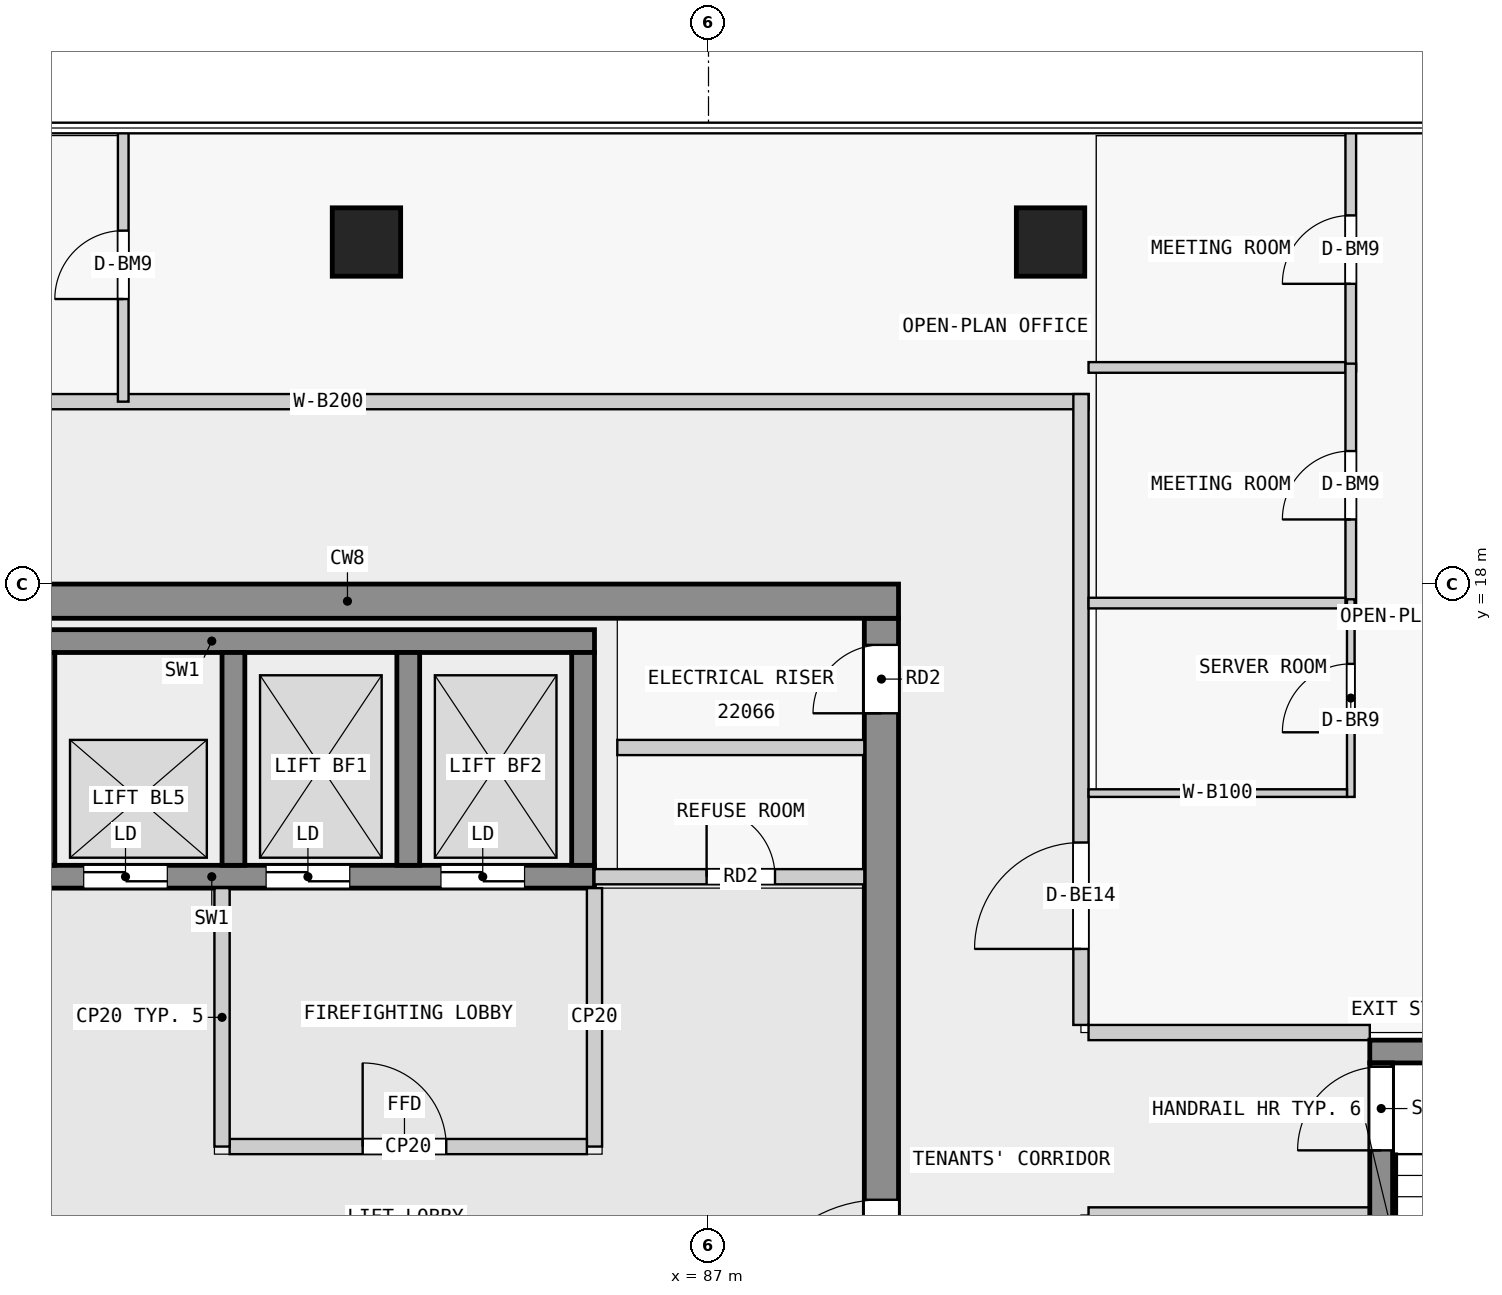
"""IFC4 building model, lengths in metres.
Left out: names, types, materials, properties, quantities, classifications, styles, units other than length and angle.
Written with IfcOpenShell. Run it as: python <this file> out.ifc"""

import sys

from ifc_helpers import new_model, si_unit, direction, frame, frame_2d, origin, origin_2d, place, context, subcontext, project, spatial, rectangle, extrude, element, fill, save


model = new_model("IFC4")
c1 = context("Model", 3, precision=1e-05, world=origin(), true_north=direction((0.0, 1.0)))
c2 = subcontext(c1, "Body", "Model", "MODEL_VIEW")
j1 = project(units=[si_unit("LENGTHUNIT", "METRE"), si_unit("PLANEANGLEUNIT", "RADIAN")], contexts=[c1])
p1 = place(None, origin())
s1 = spatial("IfcSite", under=j1, at=p1, CompositionType="ELEMENT")
p2 = place(p1, origin())
s2 = spatial("IfcBuilding", under=s1, at=p2, CompositionType="ELEMENT")
p3 = place(p2, frame((0.0, 0.0, 88.8)))
s3 = spatial("IfcBuildingStorey", under=s2, at=p3, CompositionType="ELEMENT", Elevation=88.8)
for number, where, z_axis, x_axis in (
    (1, (91.5, 22.5, 0.0), (0.0, 0.0, 1.0), (1.0, 0.0, 0.0)),
    (2, (82.5, 22.5, 0.0), (0.0, 0.0, 1.0), (1.0, 0.0, 0.0)),
):
    element("IfcColumn", number, at=place(p3, frame(where, z_axis=z_axis, x_axis=x_axis)), inside=s3, PredefinedType="COLUMN", context=c2, shape_type="SweptSolid", body=[
        extrude(rectangle(XDim=0.9, YDim=0.9, at=origin_2d()), origin(), (0.0, 0.0, 1.0), 3.5),
    ])
p4 = place(p3, frame((75.0, 17.775, 0.0), z_axis=(0.0, 0.0, 1.0), x_axis=(1.0, 0.0, 0.0)))
e3 = element("IfcWall", 3, at=p4, inside=s3, PredefinedType="SHEAR", context=c2, shape_type="SweptSolid", body=[
    extrude(rectangle(XDim=14.5, YDim=0.45, at=frame_2d((7.25, 0.0))), origin(), (0.0, 0.0, 1.0), 3.25),
])
p5 = place(p3, frame((89.275, 0.45, 0.0), z_axis=(0.0, 0.0, 1.0), x_axis=(0.0, 1.0, 0.0)))
e4 = element("IfcWall", 4, at=p5, inside=s3, PredefinedType="SHEAR", context=c2, shape_type="SweptSolid", body=[
    extrude(rectangle(XDim=17.1, YDim=0.45, at=frame_2d((8.55, 0.0))), origin(), (0.0, 0.0, 1.0), 3.25),
])
p6 = place(p5, frame((7.65, 0.0, 0.0)))
e5 = element("IfcOpeningElement", 5, at=p6, cuts=e4, PredefinedType="OPENING", context=c2, shape_type="SweptSolid", body=[
    extrude(rectangle(XDim=1.8, YDim=2.1, at=frame_2d((0.9, 1.05))), frame((0.0, 0.235, 0.0), z_axis=(0.0, -1.0, 0.0), x_axis=(1.0, 0.0, 0.0)), (0.0, 0.0, 1.0), 0.47),
])
p7 = place(p5, frame((15.85, 0.0, 0.0)))
e6 = element("IfcOpeningElement", 6, at=p7, cuts=e4, PredefinedType="OPENING", context=c2, shape_type="SweptSolid", body=[
    extrude(rectangle(XDim=0.9, YDim=2.1, at=frame_2d((0.45, 1.05))), frame((0.0, 0.235, 0.0), z_axis=(0.0, -1.0, 0.0), x_axis=(1.0, 0.0, 0.0)), (0.0, 0.0, 1.0), 0.47),
])
p8 = place(p3, frame((75.43, 17.25, 0.0), z_axis=(0.0, 0.0, 1.0), x_axis=(1.0, 0.0, 0.0)))
e7 = element("IfcWall", 7, at=p8, inside=s3, PredefinedType="SHEAR", context=c2, shape_type="SweptSolid", body=[
    extrude(rectangle(XDim=10.07, YDim=0.3, at=frame_2d((5.035, 0.0))), origin(), (0.0, 0.0, 1.0), 3.25),
])
p9 = place(p3, frame((75.43, 14.15, 0.0), z_axis=(0.0, 0.0, 1.0), x_axis=(1.0, 0.0, 0.0)))
e8 = element("IfcWall", 8, at=p9, inside=s3, PredefinedType="SHEAR", context=c2, shape_type="SweptSolid", body=[
    extrude(rectangle(XDim=10.07, YDim=0.3, at=frame_2d((5.035, 0.0))), origin(), (0.0, 0.0, 1.0), 3.25),
])
p10 = place(p9, frame((0.85, 0.0, 0.0)))
e9 = element("IfcOpeningElement", 9, at=p10, cuts=e8, PredefinedType="OPENING", context=c2, shape_type="SweptSolid", body=[
    extrude(rectangle(XDim=1.1, YDim=2.1, at=frame_2d((0.55, 1.05))), frame((0.0, 0.16, 0.0), z_axis=(0.0, -1.0, 0.0), x_axis=(1.0, 0.0, 0.0)), (0.0, 0.0, 1.0), 0.32),
])
p11 = place(p9, frame((3.35, 0.0, 0.0)))
e10 = element("IfcOpeningElement", 10, at=p11, cuts=e8, PredefinedType="OPENING", context=c2, shape_type="SweptSolid", body=[
    extrude(rectangle(XDim=1.1, YDim=2.1, at=frame_2d((0.55, 1.05))), frame((0.0, 0.16, 0.0), z_axis=(0.0, -1.0, 0.0), x_axis=(1.0, 0.0, 0.0)), (0.0, 0.0, 1.0), 0.32),
])
p12 = place(p9, frame((5.75, 0.0, 0.0)))
e11 = element("IfcOpeningElement", 11, at=p12, cuts=e8, PredefinedType="OPENING", context=c2, shape_type="SweptSolid", body=[
    extrude(rectangle(XDim=1.1, YDim=2.1, at=frame_2d((0.55, 1.05))), frame((0.0, 0.16, 0.0), z_axis=(0.0, -1.0, 0.0), x_axis=(1.0, 0.0, 0.0)), (0.0, 0.0, 1.0), 0.32),
])
p13 = place(p9, frame((8.05, 0.0, 0.0)))
e12 = element("IfcOpeningElement", 12, at=p13, cuts=e8, PredefinedType="OPENING", context=c2, shape_type="SweptSolid", body=[
    extrude(rectangle(XDim=1.1, YDim=2.1, at=frame_2d((0.55, 1.05))), frame((0.0, 0.16, 0.0), z_axis=(0.0, -1.0, 0.0), x_axis=(1.0, 0.0, 0.0)), (0.0, 0.0, 1.0), 0.32),
])
for number, where, z_axis, x_axis in (
    (13, (78.25, 14.3, 0.0), (0.0, 0.0, 1.0), (0.0, 1.0, 0.0)),
    (14, (80.75, 14.3, 0.0), (0.0, 0.0, 1.0), (0.0, 1.0, 0.0)),
    (15, (83.05, 14.3, 0.0), (0.0, 0.0, 1.0), (0.0, 1.0, 0.0)),
    (16, (85.35, 14.3, 0.0), (0.0, 0.0, 1.0), (0.0, 1.0, 0.0)),
):
    element("IfcWall", number, at=place(p3, frame(where, z_axis=z_axis, x_axis=x_axis)), inside=s3, PredefinedType="SHEAR", context=c2, shape_type="SweptSolid", body=[
        extrude(rectangle(XDim=2.8, YDim=0.3, at=frame_2d((1.4, 0.0))), origin(), (0.0, 0.0, 1.0), 3.25),
    ])
p14 = place(p3, frame((95.85, 5.3, 0.0), z_axis=(0.0, 0.0, 1.0), x_axis=(0.0, 1.0, 0.0)))
e17 = element("IfcWall", 17, at=p14, inside=s3, PredefinedType="SHEAR", context=c2, shape_type="SweptSolid", body=[
    extrude(rectangle(XDim=6.4, YDim=0.3, at=frame_2d((3.2, 0.0))), origin(), (0.0, 0.0, 1.0), 3.25),
])
p15 = place(p14, frame((5.25, 0.0, 0.0)))
e18 = element("IfcOpeningElement", 18, at=p15, cuts=e17, PredefinedType="OPENING", context=c2, shape_type="SweptSolid", body=[
    extrude(rectangle(XDim=1.1, YDim=2.1, at=frame_2d((0.55, 1.05))), frame((0.0, 0.16, 0.0), z_axis=(0.0, -1.0, 0.0), x_axis=(1.0, 0.0, 0.0)), (0.0, 0.0, 1.0), 0.32),
])
p16 = place(p3, frame((95.7, 11.85, 0.0), z_axis=(0.0, 0.0, 1.0), x_axis=(1.0, 0.0, 0.0)))
e19 = element("IfcWall", 19, at=p16, inside=s3, PredefinedType="SHEAR", context=c2, shape_type="SweptSolid", body=[
    extrude(rectangle(XDim=3.15, YDim=0.3, at=frame_2d((1.575, 0.0))), origin(), (0.0, 0.0, 1.0), 3.25),
])
p17 = place(p3, frame((80.6, 10.6, 0.0), z_axis=(0.0, 0.0, 1.0), x_axis=(0.0, 1.0, 0.0)))
e20 = element("IfcWall", 20, at=p17, inside=s3, PredefinedType="PARTITIONING", context=c2, shape_type="SweptSolid", body=[
    extrude(rectangle(XDim=3.4, YDim=0.2, at=frame_2d((1.7, 0.0))), origin(), (0.0, 0.0, 1.0), 3.25),
])
p18 = place(p3, frame((80.7, 10.6, 0.0), z_axis=(0.0, 0.0, 1.0), x_axis=(1.0, 0.0, 0.0)))
e21 = element("IfcWall", 21, at=p18, inside=s3, PredefinedType="PARTITIONING", context=c2, shape_type="SweptSolid", body=[
    extrude(rectangle(XDim=4.7, YDim=0.2, at=frame_2d((2.35, 0.0))), origin(), (0.0, 0.0, 1.0), 3.25),
])
p19 = place(p18, frame((1.75, 0.0, 0.0)))
e22 = element("IfcOpeningElement", 22, at=p19, cuts=e21, PredefinedType="OPENING", context=c2, shape_type="SweptSolid", body=[
    extrude(rectangle(XDim=1.1, YDim=2.1, at=frame_2d((0.55, 1.05))), frame((0.0, 0.11, 0.0), z_axis=(0.0, -1.0, 0.0), x_axis=(1.0, 0.0, 0.0)), (0.0, 0.0, 1.0), 0.22),
])
p20 = place(p3, frame((85.5, 10.6, 0.0), z_axis=(0.0, 0.0, 1.0), x_axis=(0.0, 1.0, 0.0)))
e23 = element("IfcWall", 23, at=p20, inside=s3, PredefinedType="PARTITIONING", context=c2, shape_type="SweptSolid", body=[
    extrude(rectangle(XDim=3.4, YDim=0.2, at=frame_2d((1.7, 0.0))), origin(), (0.0, 0.0, 1.0), 3.25),
])
p21 = place(p3, frame((85.5, 14.15, 0.0), z_axis=(0.0, 0.0, 1.0), x_axis=(1.0, 0.0, 0.0)))
e24 = element("IfcWall", 24, at=p21, inside=s3, PredefinedType="PARTITIONING", context=c2, shape_type="SweptSolid", body=[
    extrude(rectangle(XDim=3.55, YDim=0.2, at=frame_2d((1.775, 0.0))), origin(), (0.0, 0.0, 1.0), 3.25),
])
p22 = place(p21, frame((1.475, 0.0, 0.0)))
e25 = element("IfcOpeningElement", 25, at=p22, cuts=e24, PredefinedType="OPENING", context=c2, shape_type="SweptSolid", body=[
    extrude(rectangle(XDim=0.9, YDim=2.1, at=frame_2d((0.45, 1.05))), frame((0.0, 0.11, 0.0), z_axis=(0.0, -1.0, 0.0), x_axis=(1.0, 0.0, 0.0)), (0.0, 0.0, 1.0), 0.22),
])
p23 = place(p3, frame((85.8, 15.85, 0.0), z_axis=(0.0, 0.0, 1.0), x_axis=(1.0, 0.0, 0.0)))
e26 = element("IfcWall", 26, at=p23, inside=s3, PredefinedType="PARTITIONING", context=c2, shape_type="SweptSolid", body=[
    extrude(rectangle(XDim=3.25, YDim=0.2, at=frame_2d((1.625, 0.0))), origin(), (0.0, 0.0, 1.0), 3.25),
])
p24 = place(p3, frame((72.0, 20.4, 0.0), z_axis=(0.0, 0.0, 1.0), x_axis=(1.0, 0.0, 0.0)))
e27 = element("IfcWall", 27, at=p24, inside=s3, PredefinedType="PARTITIONING", context=c2, shape_type="SweptSolid", body=[
    extrude(rectangle(XDim=20.0, YDim=0.2, at=frame_2d((10.0, 0.0))), origin(), (0.0, 0.0, 1.0), 3.25),
])
p25 = place(p3, frame((91.9, 12.2, 0.0), z_axis=(0.0, 0.0, 1.0), x_axis=(0.0, 1.0, 0.0)))
e28 = element("IfcWall", 28, at=p25, inside=s3, PredefinedType="PARTITIONING", context=c2, shape_type="SweptSolid", body=[
    extrude(rectangle(XDim=8.3, YDim=0.2, at=frame_2d((4.15, 0.0))), origin(), (0.0, 0.0, 1.0), 3.25),
])
p26 = place(p25, frame((1.0, 0.0, 0.0)))
e29 = element("IfcOpeningElement", 29, at=p26, cuts=e28, PredefinedType="OPENING", context=c2, shape_type="SweptSolid", body=[
    extrude(rectangle(XDim=1.4, YDim=2.4, at=frame_2d((0.7, 1.2))), frame((0.0, 0.11, 0.0), z_axis=(0.0, -1.0, 0.0), x_axis=(1.0, 0.0, 0.0)), (0.0, 0.0, 1.0), 0.22),
])
for number, where, z_axis, x_axis in (
    (30, (92.0, 9.7, 0.0), (0.0, 0.0, 1.0), (1.0, 0.0, 0.0)),
    (31, (92.0, 12.1, 0.0), (0.0, 0.0, 1.0), (1.0, 0.0, 0.0)),
):
    element("IfcWall", number, at=place(p3, frame(where, z_axis=z_axis, x_axis=x_axis)), inside=s3, PredefinedType="PARTITIONING", context=c2, shape_type="SweptSolid", body=[
        extrude(rectangle(XDim=3.7, YDim=0.2, at=frame_2d((1.85, 0.0))), origin(), (0.0, 0.0, 1.0), 3.25),
    ])
p27 = place(p3, frame((95.45, 20.8, 0.0), z_axis=(0.0, 0.0, 1.0), x_axis=(0.0, 1.0, 0.0)))
e32 = element("IfcWall", 32, at=p27, inside=s3, PredefinedType="PARTITIONING", context=c2, shape_type="SweptSolid", body=[
    extrude(rectangle(XDim=3.2, YDim=0.14, at=frame_2d((1.6, 0.0))), origin(), (0.0, 0.0, 1.0), 3.25),
])
p28 = place(p27, frame((1.15, 0.0, 0.0)))
e33 = element("IfcOpeningElement", 33, at=p28, cuts=e32, PredefinedType="OPENING", context=c2, shape_type="SweptSolid", body=[
    extrude(rectangle(XDim=0.9, YDim=2.4, at=frame_2d((0.45, 1.2))), frame((0.0, 0.08, 0.0), z_axis=(0.0, -1.0, 0.0), x_axis=(1.0, 0.0, 0.0)), (0.0, 0.0, 1.0), 0.16),
])
p29 = place(p3, frame((92.0, 20.85, 0.0), z_axis=(0.0, 0.0, 1.0), x_axis=(1.0, 0.0, 0.0)))
e34 = element("IfcWall", 34, at=p29, inside=s3, PredefinedType="PARTITIONING", context=c2, shape_type="SweptSolid", body=[
    extrude(rectangle(XDim=3.38, YDim=0.14, at=frame_2d((1.69, 0.0))), origin(), (0.0, 0.0, 1.0), 3.25),
])
p30 = place(p3, frame((95.45, 17.7, 0.0), z_axis=(0.0, 0.0, 1.0), x_axis=(0.0, 1.0, 0.0)))
e35 = element("IfcWall", 35, at=p30, inside=s3, PredefinedType="PARTITIONING", context=c2, shape_type="SweptSolid", body=[
    extrude(rectangle(XDim=3.2, YDim=0.14, at=frame_2d((1.6, 0.0))), origin(), (0.0, 0.0, 1.0), 3.25),
])
p31 = place(p30, frame((1.15, 0.0, 0.0)))
e36 = element("IfcOpeningElement", 36, at=p31, cuts=e35, PredefinedType="OPENING", context=c2, shape_type="SweptSolid", body=[
    extrude(rectangle(XDim=0.9, YDim=2.4, at=frame_2d((0.45, 1.2))), frame((0.0, 0.08, 0.0), z_axis=(0.0, -1.0, 0.0), x_axis=(1.0, 0.0, 0.0)), (0.0, 0.0, 1.0), 0.16),
])
p32 = place(p3, frame((92.0, 17.75, 0.0), z_axis=(0.0, 0.0, 1.0), x_axis=(1.0, 0.0, 0.0)))
e37 = element("IfcWall", 37, at=p32, inside=s3, PredefinedType="PARTITIONING", context=c2, shape_type="SweptSolid", body=[
    extrude(rectangle(XDim=3.38, YDim=0.14, at=frame_2d((1.69, 0.0))), origin(), (0.0, 0.0, 1.0), 3.25),
])
p33 = place(p3, frame((95.45, 15.2, 0.0), z_axis=(0.0, 0.0, 1.0), x_axis=(0.0, 1.0, 0.0)))
e38 = element("IfcWall", 38, at=p33, inside=s3, PredefinedType="PARTITIONING", context=c2, shape_type="SweptSolid", body=[
    extrude(rectangle(XDim=2.6, YDim=0.1, at=frame_2d((1.3, 0.0))), origin(), (0.0, 0.0, 1.0), 3.25),
])
p34 = place(p33, frame((0.85, 0.0, 0.0)))
e39 = element("IfcOpeningElement", 39, at=p34, cuts=e38, PredefinedType="OPENING", context=c2, shape_type="SweptSolid", body=[
    extrude(rectangle(XDim=0.9, YDim=2.1, at=frame_2d((0.45, 1.05))), frame((0.0, 0.06, 0.0), z_axis=(0.0, -1.0, 0.0), x_axis=(1.0, 0.0, 0.0)), (0.0, 0.0, 1.0), 0.12),
])
p35 = place(p3, frame((92.0, 15.25, 0.0), z_axis=(0.0, 0.0, 1.0), x_axis=(1.0, 0.0, 0.0)))
e40 = element("IfcWall", 40, at=p35, inside=s3, PredefinedType="PARTITIONING", context=c2, shape_type="SweptSolid", body=[
    extrude(rectangle(XDim=3.4, YDim=0.1, at=frame_2d((1.7, 0.0))), origin(), (0.0, 0.0, 1.0), 3.25),
])
p36 = place(p3, frame((79.3, 20.4, 0.0), z_axis=(0.0, 0.0, 1.0), x_axis=(0.0, 1.0, 0.0)))
e41 = element("IfcWall", 41, at=p36, inside=s3, PredefinedType="PARTITIONING", context=c2, shape_type="SweptSolid", body=[
    extrude(rectangle(XDim=3.6, YDim=0.14, at=frame_2d((1.8, 0.0))), origin(), (0.0, 0.0, 1.0), 3.25),
])
p37 = place(p36, frame((1.35, 0.0, 0.0)))
e42 = element("IfcOpeningElement", 42, at=p37, cuts=e41, PredefinedType="OPENING", context=c2, shape_type="SweptSolid", body=[
    extrude(rectangle(XDim=0.9, YDim=2.4, at=frame_2d((0.45, 1.2))), frame((0.0, 0.08, 0.0), z_axis=(0.0, -1.0, 0.0), x_axis=(1.0, 0.0, 0.0)), (0.0, 0.0, 1.0), 0.16),
])
p38 = place(p19, origin())
e43 = element("IfcDoor", 43, at=p38, inside=s3, OperationType="SINGLE_SWING_LEFT", PredefinedType="DOOR", context=c2, shape_type="SweptSolid", body=[
    extrude(rectangle(XDim=1.1, YDim=2.1, at=frame_2d((0.55, 1.05))), frame((0.0, 0.025, 0.0), z_axis=(0.0, -1.0, 0.0), x_axis=(1.0, 0.0, 0.0)), (0.0, 0.0, 1.0), 0.05),
])
fill(e22, e43)
p39 = place(p11, origin())
e44 = element("IfcDoor", 44, at=p39, inside=s3, OperationType="DOUBLE_DOOR_SLIDING", PredefinedType="DOOR", context=c2, shape_type="SweptSolid", body=[
    extrude(rectangle(XDim=1.1, YDim=2.1, at=frame_2d((0.55, 1.05))), frame((0.0, 0.025, 0.0), z_axis=(0.0, -1.0, 0.0), x_axis=(1.0, 0.0, 0.0)), (0.0, 0.0, 1.0), 0.05),
])
fill(e10, e44)
p40 = place(p12, origin())
e45 = element("IfcDoor", 45, at=p40, inside=s3, OperationType="DOUBLE_DOOR_SLIDING", PredefinedType="DOOR", context=c2, shape_type="SweptSolid", body=[
    extrude(rectangle(XDim=1.1, YDim=2.1, at=frame_2d((0.55, 1.05))), frame((0.0, 0.025, 0.0), z_axis=(0.0, -1.0, 0.0), x_axis=(1.0, 0.0, 0.0)), (0.0, 0.0, 1.0), 0.05),
])
fill(e11, e45)
p41 = place(p13, origin())
e46 = element("IfcDoor", 46, at=p41, inside=s3, OperationType="DOUBLE_DOOR_SLIDING", PredefinedType="DOOR", context=c2, shape_type="SweptSolid", body=[
    extrude(rectangle(XDim=1.1, YDim=2.1, at=frame_2d((0.55, 1.05))), frame((0.0, 0.025, 0.0), z_axis=(0.0, -1.0, 0.0), x_axis=(1.0, 0.0, 0.0)), (0.0, 0.0, 1.0), 0.05),
])
fill(e12, e46)
p42 = place(p15, origin())
e47 = element("IfcDoor", 47, at=p42, inside=s3, OperationType="SINGLE_SWING_LEFT", PredefinedType="DOOR", context=c2, shape_type="SweptSolid", body=[
    extrude(rectangle(XDim=1.1, YDim=2.1, at=frame_2d((0.55, 1.05))), frame((0.0, 0.025, 0.0), z_axis=(0.0, -1.0, 0.0), x_axis=(1.0, 0.0, 0.0)), (0.0, 0.0, 1.0), 0.05),
])
fill(e18, e47)
p43 = place(p6, origin())
e48 = element("IfcDoor", 48, at=p43, inside=s3, OperationType="DOUBLE_DOOR_SINGLE_SWING", PredefinedType="DOOR", context=c2, shape_type="SweptSolid", body=[
    extrude(rectangle(XDim=1.8, YDim=2.1, at=frame_2d((0.9, 1.05))), frame((0.0, 0.025, 0.0), z_axis=(0.0, -1.0, 0.0), x_axis=(1.0, 0.0, 0.0)), (0.0, 0.0, 1.0), 0.05),
])
fill(e5, e48)
p44 = place(p22, origin())
e49 = element("IfcDoor", 49, at=p44, inside=s3, OperationType="SINGLE_SWING_LEFT", PredefinedType="DOOR", context=c2, shape_type="SweptSolid", body=[
    extrude(rectangle(XDim=0.9, YDim=2.1, at=frame_2d((0.45, 1.05))), frame((0.0, 0.025, 0.0), z_axis=(0.0, -1.0, 0.0), x_axis=(1.0, 0.0, 0.0)), (0.0, 0.0, 1.0), 0.05),
])
fill(e25, e49)
p45 = place(p7, origin())
e50 = element("IfcDoor", 50, at=p45, inside=s3, OperationType="SINGLE_SWING_LEFT", PredefinedType="DOOR", context=c2, shape_type="SweptSolid", body=[
    extrude(rectangle(XDim=0.9, YDim=2.1, at=frame_2d((0.45, 1.05))), frame((0.0, 0.025, 0.0), z_axis=(0.0, -1.0, 0.0), x_axis=(1.0, 0.0, 0.0)), (0.0, 0.0, 1.0), 0.05),
])
fill(e6, e50)
p46 = place(p26, origin())
e51 = element("IfcDoor", 51, at=p46, inside=s3, OperationType="DOUBLE_DOOR_SINGLE_SWING", PredefinedType="DOOR", context=c2, shape_type="SweptSolid", body=[
    extrude(rectangle(XDim=1.4, YDim=2.4, at=frame_2d((0.7, 1.2))), frame((0.0, 0.025, 0.0), z_axis=(0.0, -1.0, 0.0), x_axis=(1.0, 0.0, 0.0)), (0.0, 0.0, 1.0), 0.05),
])
fill(e29, e51)
p47 = place(p28, origin())
e52 = element("IfcDoor", 52, at=p47, inside=s3, OperationType="SINGLE_SWING_LEFT", PredefinedType="DOOR", context=c2, shape_type="SweptSolid", body=[
    extrude(rectangle(XDim=0.9, YDim=2.4, at=frame_2d((0.45, 1.2))), frame((0.0, 0.025, 0.0), z_axis=(0.0, -1.0, 0.0), x_axis=(1.0, 0.0, 0.0)), (0.0, 0.0, 1.0), 0.05),
])
fill(e33, e52)
p48 = place(p31, origin())
e53 = element("IfcDoor", 53, at=p48, inside=s3, OperationType="SINGLE_SWING_LEFT", PredefinedType="DOOR", context=c2, shape_type="SweptSolid", body=[
    extrude(rectangle(XDim=0.9, YDim=2.4, at=frame_2d((0.45, 1.2))), frame((0.0, 0.025, 0.0), z_axis=(0.0, -1.0, 0.0), x_axis=(1.0, 0.0, 0.0)), (0.0, 0.0, 1.0), 0.05),
])
fill(e36, e53)
p49 = place(p34, origin())
e54 = element("IfcDoor", 54, at=p49, inside=s3, OperationType="SINGLE_SWING_LEFT", PredefinedType="DOOR", context=c2, shape_type="SweptSolid", body=[
    extrude(rectangle(XDim=0.9, YDim=2.1, at=frame_2d((0.45, 1.05))), frame((0.0, 0.025, 0.0), z_axis=(0.0, -1.0, 0.0), x_axis=(1.0, 0.0, 0.0)), (0.0, 0.0, 1.0), 0.05),
])
fill(e39, e54)
p50 = place(p37, origin())
e55 = element("IfcDoor", 55, at=p50, inside=s3, OperationType="SINGLE_SWING_LEFT", PredefinedType="DOOR", context=c2, shape_type="SweptSolid", body=[
    extrude(rectangle(XDim=0.9, YDim=2.4, at=frame_2d((0.45, 1.2))), frame((0.0, 0.025, 0.0), z_axis=(0.0, -1.0, 0.0), x_axis=(1.0, 0.0, 0.0)), (0.0, 0.0, 1.0), 0.05),
])
fill(e42, e55)
save(model, sys.argv[1])
